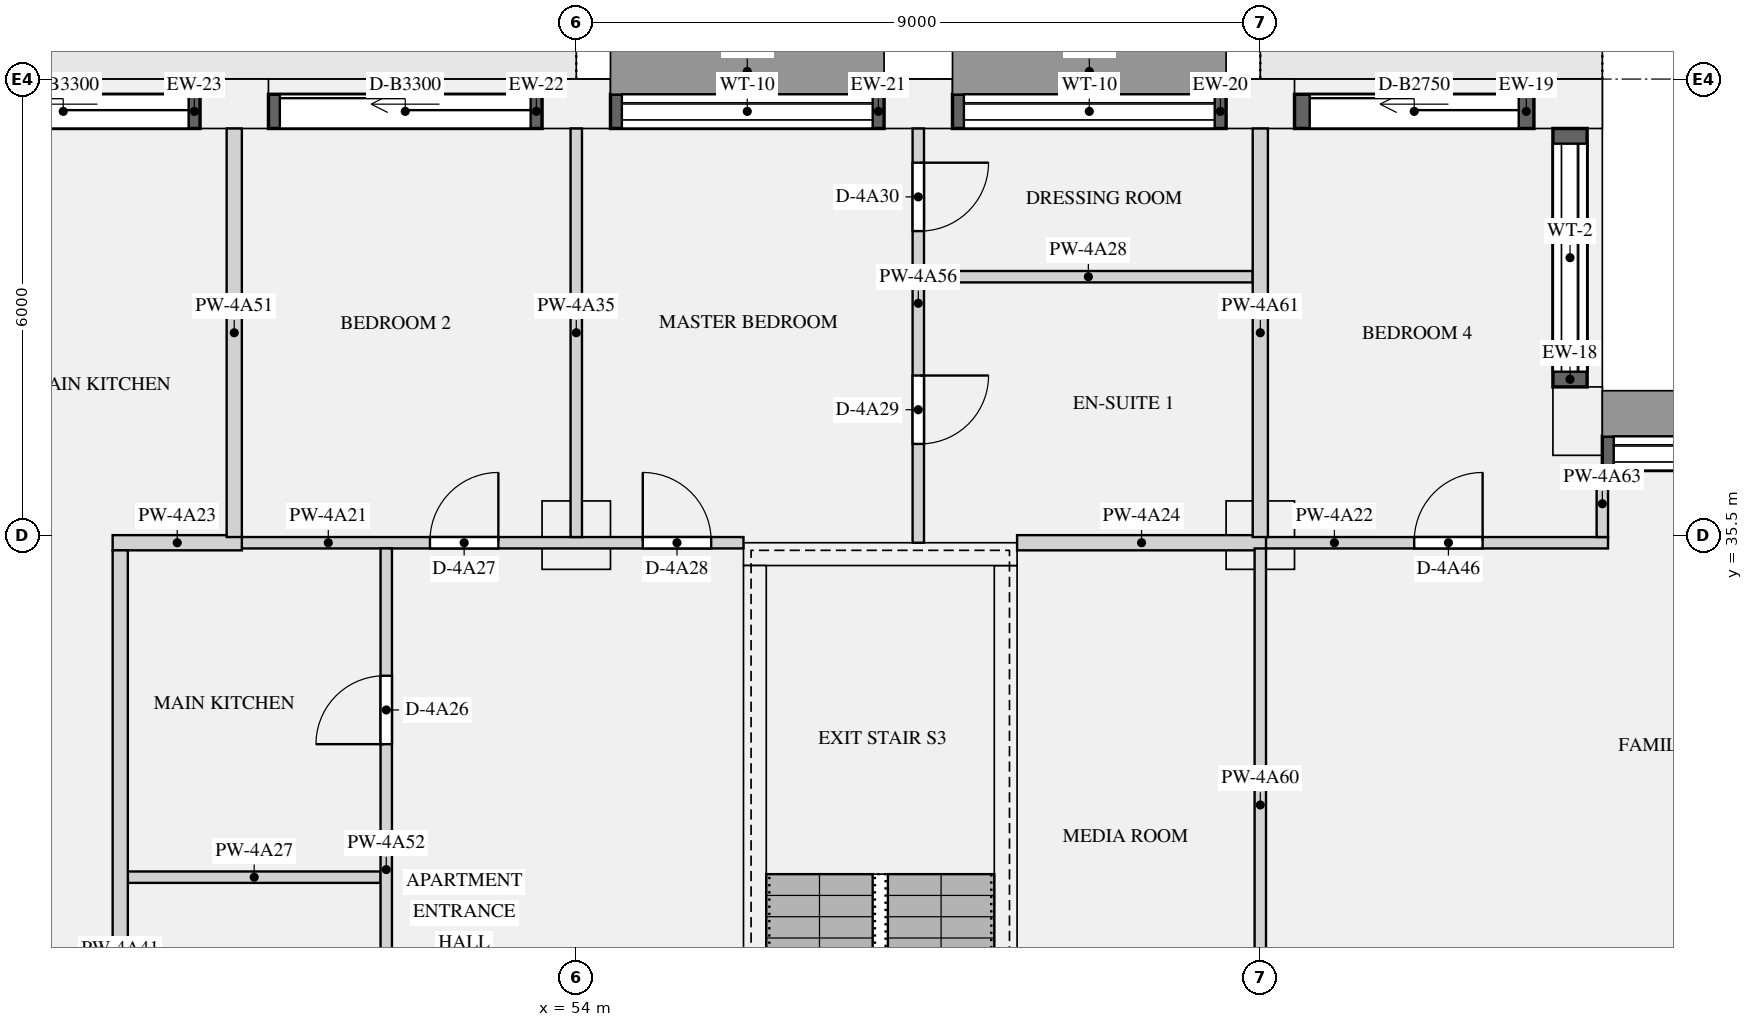
"""IFC4 building model, lengths in metres.
Left out: names, types, materials, properties, quantities, classifications, styles, units other than length and angle.
Written with IfcOpenShell. Run it as: python <this file> out.ifc"""

import sys

from ifc_helpers import new_model, si_unit, direction, frame, frame_2d, origin, origin_2d, place, context, subcontext, project, spatial, rectangle, extrude, element, fill, save


model = new_model("IFC4")
c1 = context("Model", 3, precision=1e-05, world=origin(), true_north=direction((0.0, 1.0)))
c2 = subcontext(c1, "Body", "Model", "MODEL_VIEW")
j1 = project(units=[si_unit("LENGTHUNIT", "METRE"), si_unit("PLANEANGLEUNIT", "RADIAN")], contexts=[c1])
p1 = place(None, origin())
s1 = spatial("IfcSite", under=j1, at=p1, CompositionType="ELEMENT")
p2 = place(p1, origin())
s2 = spatial("IfcBuilding", under=s1, at=p2, CompositionType="ELEMENT")
p3 = place(p2, frame((0.0, 0.0, 198.0)))
s3 = spatial("IfcBuildingStorey", under=s2, at=p3, CompositionType="ELEMENT", Elevation=198.0)
for number, where, z_axis, x_axis in (
    (1, (67.175, 37.0, 0.0), (0.0, 0.0, 1.0), (0.0, 1.0, 0.0)),
    (2, (67.05, 41.175, 0.0), (0.0, 0.0, 1.0), (-1.0, 0.0, 0.0)),
    (3, (63.0, 41.175, 0.0), (0.0, 0.0, 1.0), (-1.0, 0.0, 0.0)),
    (4, (58.5, 41.175, 0.0), (0.0, 0.0, 1.0), (-1.0, 0.0, 0.0)),
    (5, (54.0, 41.175, 0.0), (0.0, 0.0, 1.0), (-1.0, 0.0, 0.0)),
    (6, (49.5, 41.175, 0.0), (0.0, 0.0, 1.0), (-1.0, 0.0, 0.0)),
):
    element("IfcColumn", number, at=place(p3, frame(where, z_axis=z_axis, x_axis=x_axis)), inside=s3, PredefinedType="USERDEFINED", context=c2, shape_type="SweptSolid", body=[
        extrude(rectangle(XDim=0.9, YDim=0.65, at=origin_2d()), origin(), (0.0, 0.0, 1.0), 3.15),
    ])
for number, where, z_axis, x_axis in (
    (7, (54.0, 35.5, 0.0), (0.0, 0.0, 1.0), (1.0, 0.0, 0.0)),
    (8, (63.0, 35.5, 0.0), (0.0, 0.0, 1.0), (1.0, 0.0, 0.0)),
):
    element("IfcColumn", number, at=place(p3, frame(where, z_axis=z_axis, x_axis=x_axis)), inside=s3, PredefinedType="COLUMN", context=c2, shape_type="SweptSolid", body=[
        extrude(rectangle(XDim=0.9, YDim=0.9, at=origin_2d()), origin(), (0.0, 0.0, 1.0), 3.15),
    ])
p4 = place(p3, frame((56.2, 35.25, 0.0), z_axis=(0.0, 0.0, 1.0), x_axis=(1.0, 0.0, 0.0)))
e9 = element("IfcWall", 9, at=p4, inside=s3, PredefinedType="SHEAR", context=c2, shape_type="SweptSolid", body=[
    extrude(rectangle(XDim=3.6, YDim=0.3, at=frame_2d((1.8, 0.0))), origin(), (0.0, 0.0, 1.0), 3.15),
])
for number, where, z_axis, x_axis in (
    (10, (56.35, 27.3, 0.0), (0.0, 0.0, 1.0), (0.0, 1.0, 0.0)),
    (11, (59.65, 27.3, 0.0), (0.0, 0.0, 1.0), (0.0, 1.0, 0.0)),
):
    element("IfcWall", number, at=place(p3, frame(where, z_axis=z_axis, x_axis=x_axis)), inside=s3, PredefinedType="SHEAR", context=c2, shape_type="SweptSolid", body=[
        extrude(rectangle(XDim=7.8, YDim=0.3, at=frame_2d((3.9, 0.0))), origin(), (0.0, 0.0, 1.0), 3.15),
    ])
p5 = place(p3, frame((71.1, 36.575, 0.9), z_axis=(0.0, 0.0, 1.0), x_axis=(-1.0, 0.0, 0.0)))
e12 = element("IfcWall", 12, at=p5, inside=s3, PredefinedType="SOLIDWALL", context=c2, shape_type="SweptSolid", body=[
    extrude(rectangle(XDim=3.6, YDim=0.45, at=frame_2d((1.8, 0.0))), origin(), (0.0, 0.0, 1.0), 1.93),
])
p6 = place(p5, frame((0.15, 0.0, 0.15)))
e13 = element("IfcOpeningElement", 13, at=p6, cuts=e12, PredefinedType="OPENING", context=c2, shape_type="SweptSolid", body=[
    extrude(rectangle(XDim=3.3, YDim=1.5, at=frame_2d((1.65, 0.75))), frame((0.0, 0.235, 0.0), z_axis=(0.0, -1.0, 0.0), x_axis=(1.0, 0.0, 0.0)), (0.0, 0.0, 1.0), 0.47),
])
p7 = place(p3, frame((67.075, 37.45, 0.9), z_axis=(0.0, 0.0, 1.0), x_axis=(0.0, 1.0, 0.0)))
e14 = element("IfcWall", 14, at=p7, inside=s3, PredefinedType="SOLIDWALL", context=c2, shape_type="SweptSolid", body=[
    extrude(rectangle(XDim=3.4, YDim=0.45, at=frame_2d((1.7, 0.0))), origin(), (0.0, 0.0, 1.0), 1.93),
])
p8 = place(p7, frame((0.2, 0.0, 0.15)))
e15 = element("IfcOpeningElement", 15, at=p8, cuts=e14, PredefinedType="OPENING", context=c2, shape_type="SweptSolid", body=[
    extrude(rectangle(XDim=3.0, YDim=1.5, at=frame_2d((1.5, 0.75))), frame((0.0, 0.235, 0.0), z_axis=(0.0, -1.0, 0.0), x_axis=(1.0, 0.0, 0.0)), (0.0, 0.0, 1.0), 0.47),
])
p9 = place(p3, frame((66.6, 41.075, 0.0), z_axis=(0.0, 0.0, 1.0), x_axis=(-1.0, 0.0, 0.0)))
e16 = element("IfcWall", 16, at=p9, inside=s3, PredefinedType="SOLIDWALL", context=c2, shape_type="SweptSolid", body=[
    extrude(rectangle(XDim=3.15, YDim=0.45, at=frame_2d((1.575, 0.0))), origin(), (0.0, 0.0, 1.0), 2.83),
])
p10 = place(p9, frame((0.2, 0.0, 0.0)))
e17 = element("IfcOpeningElement", 17, at=p10, cuts=e16, PredefinedType="OPENING", context=c2, shape_type="SweptSolid", body=[
    extrude(rectangle(XDim=2.75, YDim=2.3, at=frame_2d((1.375, 1.15))), frame((0.0, 0.235, 0.0), z_axis=(0.0, -1.0, 0.0), x_axis=(1.0, 0.0, 0.0)), (0.0, 0.0, 1.0), 0.47),
])
p11 = place(p3, frame((62.55, 41.075, 0.9), z_axis=(0.0, 0.0, 1.0), x_axis=(-1.0, 0.0, 0.0)))
e18 = element("IfcWall", 18, at=p11, inside=s3, PredefinedType="SOLIDWALL", context=c2, shape_type="SweptSolid", body=[
    extrude(rectangle(XDim=3.6, YDim=0.45, at=frame_2d((1.8, 0.0))), origin(), (0.0, 0.0, 1.0), 1.93),
])
p12 = place(p11, frame((0.15, 0.0, 0.15)))
e19 = element("IfcOpeningElement", 19, at=p12, cuts=e18, PredefinedType="OPENING", context=c2, shape_type="SweptSolid", body=[
    extrude(rectangle(XDim=3.3, YDim=1.5, at=frame_2d((1.65, 0.75))), frame((0.0, 0.235, 0.0), z_axis=(0.0, -1.0, 0.0), x_axis=(1.0, 0.0, 0.0)), (0.0, 0.0, 1.0), 0.47),
])
p13 = place(p3, frame((58.05, 41.075, 0.9), z_axis=(0.0, 0.0, 1.0), x_axis=(-1.0, 0.0, 0.0)))
e20 = element("IfcWall", 20, at=p13, inside=s3, PredefinedType="SOLIDWALL", context=c2, shape_type="SweptSolid", body=[
    extrude(rectangle(XDim=3.6, YDim=0.45, at=frame_2d((1.8, 0.0))), origin(), (0.0, 0.0, 1.0), 1.93),
])
p14 = place(p13, frame((0.15, 0.0, 0.15)))
e21 = element("IfcOpeningElement", 21, at=p14, cuts=e20, PredefinedType="OPENING", context=c2, shape_type="SweptSolid", body=[
    extrude(rectangle(XDim=3.3, YDim=1.5, at=frame_2d((1.65, 0.75))), frame((0.0, 0.235, 0.0), z_axis=(0.0, -1.0, 0.0), x_axis=(1.0, 0.0, 0.0)), (0.0, 0.0, 1.0), 0.47),
])
p15 = place(p3, frame((53.55, 41.075, 0.0), z_axis=(0.0, 0.0, 1.0), x_axis=(-1.0, 0.0, 0.0)))
e22 = element("IfcWall", 22, at=p15, inside=s3, PredefinedType="SOLIDWALL", context=c2, shape_type="SweptSolid", body=[
    extrude(rectangle(XDim=3.6, YDim=0.45, at=frame_2d((1.8, 0.0))), origin(), (0.0, 0.0, 1.0), 2.83),
])
p16 = place(p15, frame((0.15, 0.0, 0.0)))
e23 = element("IfcOpeningElement", 23, at=p16, cuts=e22, PredefinedType="OPENING", context=c2, shape_type="SweptSolid", body=[
    extrude(rectangle(XDim=3.3, YDim=2.3, at=frame_2d((1.65, 1.15))), frame((0.0, 0.235, 0.0), z_axis=(0.0, -1.0, 0.0), x_axis=(1.0, 0.0, 0.0)), (0.0, 0.0, 1.0), 0.47),
])
p17 = place(p3, frame((49.05, 41.075, 0.0), z_axis=(0.0, 0.0, 1.0), x_axis=(-1.0, 0.0, 0.0)))
e24 = element("IfcWall", 24, at=p17, inside=s3, PredefinedType="SOLIDWALL", context=c2, shape_type="SweptSolid", body=[
    extrude(rectangle(XDim=3.6, YDim=0.45, at=frame_2d((1.8, 0.0))), origin(), (0.0, 0.0, 1.0), 2.83),
])
p18 = place(p17, frame((0.15, 0.0, 0.0)))
e25 = element("IfcOpeningElement", 25, at=p18, cuts=e24, PredefinedType="OPENING", context=c2, shape_type="SweptSolid", body=[
    extrude(rectangle(XDim=3.3, YDim=2.3, at=frame_2d((1.65, 1.15))), frame((0.0, 0.235, 0.0), z_axis=(0.0, -1.0, 0.0), x_axis=(1.0, 0.0, 0.0)), (0.0, 0.0, 1.0), 0.47),
])
p19 = place(p3, frame((49.4, 35.4, 0.0), z_axis=(0.0, 0.0, 1.0), x_axis=(1.0, 0.0, 0.0)))
e26 = element("IfcWall", 26, at=p19, inside=s3, PredefinedType="PARTITIONING", context=c2, shape_type="SweptSolid", body=[
    extrude(rectangle(XDim=6.8, YDim=0.15, at=frame_2d((3.4, 0.0))), origin(), (0.0, 0.0, 1.0), 2.83),
])
p20 = place(p19, frame((2.675, 0.0, 0.0)))
e27 = element("IfcOpeningElement", 27, at=p20, cuts=e26, PredefinedType="OPENING", context=c2, shape_type="SweptSolid", body=[
    extrude(rectangle(XDim=0.9, YDim=2.1, at=frame_2d((0.45, 1.05))), frame((0.0, 0.085, 0.0), z_axis=(0.0, -1.0, 0.0), x_axis=(1.0, 0.0, 0.0)), (0.0, 0.0, 1.0), 0.17),
])
p21 = place(p19, frame((5.475, 0.0, 0.0)))
e28 = element("IfcOpeningElement", 28, at=p21, cuts=e26, PredefinedType="OPENING", context=c2, shape_type="SweptSolid", body=[
    extrude(rectangle(XDim=0.9, YDim=2.1, at=frame_2d((0.45, 1.05))), frame((0.0, 0.085, 0.0), z_axis=(0.0, -1.0, 0.0), x_axis=(1.0, 0.0, 0.0)), (0.0, 0.0, 1.0), 0.17),
])
p22 = place(p3, frame((62.925, 35.4, 0.0), z_axis=(0.0, 0.0, 1.0), x_axis=(1.0, 0.0, 0.0)))
e29 = element("IfcWall", 29, at=p22, inside=s3, PredefinedType="PARTITIONING", context=c2, shape_type="SweptSolid", body=[
    extrude(rectangle(XDim=4.65, YDim=0.15, at=frame_2d((2.325, 0.0))), origin(), (0.0, 0.0, 1.0), 2.83),
])
p23 = place(p22, frame((2.1, 0.0, 0.0)))
e30 = element("IfcOpeningElement", 30, at=p23, cuts=e29, PredefinedType="OPENING", context=c2, shape_type="SweptSolid", body=[
    extrude(rectangle(XDim=0.9, YDim=2.1, at=frame_2d((0.45, 1.05))), frame((0.0, 0.085, 0.0), z_axis=(0.0, -1.0, 0.0), x_axis=(1.0, 0.0, 0.0)), (0.0, 0.0, 1.0), 0.17),
])
p24 = place(p3, frame((47.9, 35.4, 0.0), z_axis=(0.0, 0.0, 1.0), x_axis=(1.0, 0.0, 0.0)))
e31 = element("IfcWall", 31, at=p24, inside=s3, PredefinedType="PARTITIONING", context=c2, shape_type="SweptSolid", body=[
    extrude(rectangle(XDim=1.7, YDim=0.2, at=frame_2d((0.85, 0.0))), origin(), (0.0, 0.0, 1.0), 2.83),
])
p25 = place(p3, frame((59.8, 35.4, 0.0), z_axis=(0.0, 0.0, 1.0), x_axis=(1.0, 0.0, 0.0)))
e32 = element("IfcWall", 32, at=p25, inside=s3, PredefinedType="PARTITIONING", context=c2, shape_type="SweptSolid", body=[
    extrude(rectangle(XDim=3.275, YDim=0.2, at=frame_2d((1.637, 0.0))), origin(), (0.0, 0.0, 1.0), 2.83),
])
p26 = place(p3, frame((48.1, 31.0, 0.0), z_axis=(0.0, 0.0, 1.0), x_axis=(1.0, 0.0, 0.0)))
e33 = element("IfcWall", 33, at=p26, inside=s3, PredefinedType="PARTITIONING", context=c2, shape_type="SweptSolid", body=[
    extrude(rectangle(XDim=3.325, YDim=0.15, at=frame_2d((1.663, 0.0))), origin(), (0.0, 0.0, 1.0), 2.83),
])
p27 = place(p3, frame((58.575, 38.9, 0.0), z_axis=(0.0, 0.0, 1.0), x_axis=(1.0, 0.0, 0.0)))
e34 = element("IfcWall", 34, at=p27, inside=s3, PredefinedType="PARTITIONING", context=c2, shape_type="SweptSolid", body=[
    extrude(rectangle(XDim=4.325, YDim=0.15, at=frame_2d((2.163, 0.0))), origin(), (0.0, 0.0, 1.0), 2.83),
])
p28 = place(p3, frame((54.0, 35.475, 0.0), z_axis=(0.0, 0.0, 1.0), x_axis=(0.0, 1.0, 0.0)))
e35 = element("IfcWall", 35, at=p28, inside=s3, PredefinedType="PARTITIONING", context=c2, shape_type="SweptSolid", body=[
    extrude(rectangle(XDim=5.375, YDim=0.15, at=frame_2d((2.688, 0.0))), origin(), (0.0, 0.0, 1.0), 2.83),
])
p29 = place(p3, frame((48.0, 24.1, 0.0), z_axis=(0.0, 0.0, 1.0), x_axis=(0.0, 1.0, 0.0)))
e36 = element("IfcWall", 36, at=p29, inside=s3, PredefinedType="PARTITIONING", context=c2, shape_type="SweptSolid", body=[
    extrude(rectangle(XDim=11.2, YDim=0.2, at=frame_2d((5.6, 0.0))), origin(), (0.0, 0.0, 1.0), 2.83),
])
p30 = place(p3, frame((49.5, 35.475, 0.0), z_axis=(0.0, 0.0, 1.0), x_axis=(0.0, 1.0, 0.0)))
e37 = element("IfcWall", 37, at=p30, inside=s3, PredefinedType="PARTITIONING", context=c2, shape_type="SweptSolid", body=[
    extrude(rectangle(XDim=5.375, YDim=0.2, at=frame_2d((2.688, 0.0))), origin(), (0.0, 0.0, 1.0), 2.83),
])
p31 = place(p3, frame((51.5, 27.1, 0.0), z_axis=(0.0, 0.0, 1.0), x_axis=(0.0, 1.0, 0.0)))
e38 = element("IfcWall", 38, at=p31, inside=s3, PredefinedType="PARTITIONING", context=c2, shape_type="SweptSolid", body=[
    extrude(rectangle(XDim=8.225, YDim=0.15, at=frame_2d((4.112, 0.0))), origin(), (0.0, 0.0, 1.0), 2.83),
])
p32 = place(p31, frame((1.45, 0.0, 0.0)))
e39 = element("IfcOpeningElement", 39, at=p32, cuts=e38, PredefinedType="OPENING", context=c2, shape_type="SweptSolid", body=[
    extrude(rectangle(XDim=0.9, YDim=2.1, at=frame_2d((0.45, 1.05))), frame((0.0, 0.085, 0.0), z_axis=(0.0, -1.0, 0.0), x_axis=(1.0, 0.0, 0.0)), (0.0, 0.0, 1.0), 0.17),
])
p33 = place(p31, frame((5.65, 0.0, 0.0)))
e40 = element("IfcOpeningElement", 40, at=p33, cuts=e38, PredefinedType="OPENING", context=c2, shape_type="SweptSolid", body=[
    extrude(rectangle(XDim=0.9, YDim=2.1, at=frame_2d((0.45, 1.05))), frame((0.0, 0.085, 0.0), z_axis=(0.0, -1.0, 0.0), x_axis=(1.0, 0.0, 0.0)), (0.0, 0.0, 1.0), 0.17),
])
p34 = place(p3, frame((58.5, 35.4, 0.0), z_axis=(0.0, 0.0, 1.0), x_axis=(0.0, 1.0, 0.0)))
e41 = element("IfcWall", 41, at=p34, inside=s3, PredefinedType="PARTITIONING", context=c2, shape_type="SweptSolid", body=[
    extrude(rectangle(XDim=5.45, YDim=0.15, at=frame_2d((2.725, 0.0))), origin(), (0.0, 0.0, 1.0), 2.83),
])
p35 = place(p34, frame((1.3, 0.0, 0.0)))
e42 = element("IfcOpeningElement", 42, at=p35, cuts=e41, PredefinedType="OPENING", context=c2, shape_type="SweptSolid", body=[
    extrude(rectangle(XDim=0.9, YDim=2.1, at=frame_2d((0.45, 1.05))), frame((0.0, 0.085, 0.0), z_axis=(0.0, -1.0, 0.0), x_axis=(1.0, 0.0, 0.0)), (0.0, 0.0, 1.0), 0.17),
])
p36 = place(p34, frame((4.1, 0.0, 0.0)))
e43 = element("IfcOpeningElement", 43, at=p36, cuts=e41, PredefinedType="OPENING", context=c2, shape_type="SweptSolid", body=[
    extrude(rectangle(XDim=0.9, YDim=2.1, at=frame_2d((0.45, 1.05))), frame((0.0, 0.085, 0.0), z_axis=(0.0, -1.0, 0.0), x_axis=(1.0, 0.0, 0.0)), (0.0, 0.0, 1.0), 0.17),
])
p37 = place(p3, frame((63.0, 28.575, 0.0), z_axis=(0.0, 0.0, 1.0), x_axis=(0.0, 1.0, 0.0)))
e44 = element("IfcWall", 44, at=p37, inside=s3, PredefinedType="PARTITIONING", context=c2, shape_type="SweptSolid", body=[
    extrude(rectangle(XDim=6.75, YDim=0.15, at=frame_2d((3.375, 0.0))), origin(), (0.0, 0.0, 1.0), 2.83),
])
p38 = place(p3, frame((63.0, 35.475, 0.0), z_axis=(0.0, 0.0, 1.0), x_axis=(0.0, 1.0, 0.0)))
e45 = element("IfcWall", 45, at=p38, inside=s3, PredefinedType="PARTITIONING", context=c2, shape_type="SweptSolid", body=[
    extrude(rectangle(XDim=5.375, YDim=0.2, at=frame_2d((2.688, 0.0))), origin(), (0.0, 0.0, 1.0), 2.83),
])
p39 = place(p3, frame((67.5, 35.475, 0.0), z_axis=(0.0, 0.0, 1.0), x_axis=(0.0, 1.0, 0.0)))
e46 = element("IfcWall", 46, at=p39, inside=s3, PredefinedType="PARTITIONING", context=c2, shape_type="SweptSolid", body=[
    extrude(rectangle(XDim=0.875, YDim=0.15, at=frame_2d((0.438, 0.0))), origin(), (0.0, 0.0, 1.0), 2.83),
])
p40 = place(p6, origin())
e47 = element("IfcWindow", 47, at=p40, inside=s3, PartitioningType="SINGLE_PANEL", PredefinedType="WINDOW", context=c2, shape_type="SweptSolid", body=[
    extrude(rectangle(XDim=3.3, YDim=1.5, at=frame_2d((1.65, 0.75))), frame((0.0, -0.065, 0.0), z_axis=(0.0, -1.0, 0.0), x_axis=(1.0, 0.0, 0.0)), (0.0, 0.0, 1.0), 0.06),
])
fill(e13, e47)
p41 = place(p8, origin())
e48 = element("IfcWindow", 48, at=p41, inside=s3, PartitioningType="SINGLE_PANEL", PredefinedType="WINDOW", context=c2, shape_type="SweptSolid", body=[
    extrude(rectangle(XDim=3.0, YDim=1.5, at=frame_2d((1.5, 0.75))), frame((0.0, -0.065, 0.0), z_axis=(0.0, -1.0, 0.0), x_axis=(1.0, 0.0, 0.0)), (0.0, 0.0, 1.0), 0.06),
])
fill(e15, e48)
p42 = place(p10, origin())
e49 = element("IfcDoor", 49, at=p42, inside=s3, OperationType="SLIDING_TO_LEFT", PredefinedType="DOOR", context=c2, shape_type="SweptSolid", body=[
    extrude(rectangle(XDim=2.75, YDim=2.3, at=frame_2d((1.375, 1.15))), frame((0.0, -0.07, 0.0), z_axis=(0.0, -1.0, 0.0), x_axis=(1.0, 0.0, 0.0)), (0.0, 0.0, 1.0), 0.05),
])
fill(e17, e49)
p43 = place(p12, origin())
e50 = element("IfcWindow", 50, at=p43, inside=s3, PartitioningType="SINGLE_PANEL", PredefinedType="WINDOW", context=c2, shape_type="SweptSolid", body=[
    extrude(rectangle(XDim=3.3, YDim=1.5, at=frame_2d((1.65, 0.75))), frame((0.0, -0.065, 0.0), z_axis=(0.0, -1.0, 0.0), x_axis=(1.0, 0.0, 0.0)), (0.0, 0.0, 1.0), 0.06),
])
fill(e19, e50)
p44 = place(p14, origin())
e51 = element("IfcWindow", 51, at=p44, inside=s3, PartitioningType="SINGLE_PANEL", PredefinedType="WINDOW", context=c2, shape_type="SweptSolid", body=[
    extrude(rectangle(XDim=3.3, YDim=1.5, at=frame_2d((1.65, 0.75))), frame((0.0, -0.065, 0.0), z_axis=(0.0, -1.0, 0.0), x_axis=(1.0, 0.0, 0.0)), (0.0, 0.0, 1.0), 0.06),
])
fill(e21, e51)
p45 = place(p16, origin())
e52 = element("IfcDoor", 52, at=p45, inside=s3, OperationType="SLIDING_TO_LEFT", PredefinedType="DOOR", context=c2, shape_type="SweptSolid", body=[
    extrude(rectangle(XDim=3.3, YDim=2.3, at=frame_2d((1.65, 1.15))), frame((0.0, -0.07, 0.0), z_axis=(0.0, -1.0, 0.0), x_axis=(1.0, 0.0, 0.0)), (0.0, 0.0, 1.0), 0.05),
])
fill(e23, e52)
p46 = place(p18, origin())
e53 = element("IfcDoor", 53, at=p46, inside=s3, OperationType="SLIDING_TO_LEFT", PredefinedType="DOOR", context=c2, shape_type="SweptSolid", body=[
    extrude(rectangle(XDim=3.3, YDim=2.3, at=frame_2d((1.65, 1.15))), frame((0.0, -0.07, 0.0), z_axis=(0.0, -1.0, 0.0), x_axis=(1.0, 0.0, 0.0)), (0.0, 0.0, 1.0), 0.05),
])
fill(e25, e53)
p47 = place(p33, origin())
e54 = element("IfcDoor", 54, at=p47, inside=s3, OperationType="SINGLE_SWING_LEFT", PredefinedType="DOOR", context=c2, shape_type="SweptSolid", body=[
    extrude(rectangle(XDim=0.9, YDim=2.1, at=frame_2d((0.45, 1.05))), frame((0.0, 0.025, 0.0), z_axis=(0.0, -1.0, 0.0), x_axis=(1.0, 0.0, 0.0)), (0.0, 0.0, 1.0), 0.05),
])
fill(e40, e54)
p48 = place(p20, origin())
e55 = element("IfcDoor", 55, at=p48, inside=s3, OperationType="SINGLE_SWING_RIGHT", PredefinedType="DOOR", context=c2, shape_type="SweptSolid", body=[
    extrude(rectangle(XDim=0.9, YDim=2.1, at=frame_2d((0.45, 1.05))), frame((0.0, 0.025, 0.0), z_axis=(0.0, -1.0, 0.0), x_axis=(1.0, 0.0, 0.0)), (0.0, 0.0, 1.0), 0.05),
])
fill(e27, e55)
p49 = place(p21, origin())
e56 = element("IfcDoor", 56, at=p49, inside=s3, OperationType="SINGLE_SWING_LEFT", PredefinedType="DOOR", context=c2, shape_type="SweptSolid", body=[
    extrude(rectangle(XDim=0.9, YDim=2.1, at=frame_2d((0.45, 1.05))), frame((0.0, 0.025, 0.0), z_axis=(0.0, -1.0, 0.0), x_axis=(1.0, 0.0, 0.0)), (0.0, 0.0, 1.0), 0.05),
])
fill(e28, e56)
p50 = place(p35, frame((0.9, 0.0, 0.0), z_axis=(0.0, 0.0, 1.0), x_axis=(-1.0, 0.0, 0.0)))
e57 = element("IfcDoor", 57, at=p50, inside=s3, OperationType="SINGLE_SWING_LEFT", PredefinedType="DOOR", context=c2, shape_type="SweptSolid", body=[
    extrude(rectangle(XDim=0.9, YDim=2.1, at=frame_2d((0.45, 1.05))), frame((0.0, 0.025, 0.0), z_axis=(0.0, -1.0, 0.0), x_axis=(1.0, 0.0, 0.0)), (0.0, 0.0, 1.0), 0.05),
])
fill(e42, e57)
p51 = place(p36, frame((0.9, 0.0, 0.0), z_axis=(0.0, 0.0, 1.0), x_axis=(-1.0, 0.0, 0.0)))
e58 = element("IfcDoor", 58, at=p51, inside=s3, OperationType="SINGLE_SWING_LEFT", PredefinedType="DOOR", context=c2, shape_type="SweptSolid", body=[
    extrude(rectangle(XDim=0.9, YDim=2.1, at=frame_2d((0.45, 1.05))), frame((0.0, 0.025, 0.0), z_axis=(0.0, -1.0, 0.0), x_axis=(1.0, 0.0, 0.0)), (0.0, 0.0, 1.0), 0.05),
])
fill(e43, e58)
p52 = place(p23, origin())
e59 = element("IfcDoor", 59, at=p52, inside=s3, OperationType="SINGLE_SWING_RIGHT", PredefinedType="DOOR", context=c2, shape_type="SweptSolid", body=[
    extrude(rectangle(XDim=0.9, YDim=2.1, at=frame_2d((0.45, 1.05))), frame((0.0, 0.025, 0.0), z_axis=(0.0, -1.0, 0.0), x_axis=(1.0, 0.0, 0.0)), (0.0, 0.0, 1.0), 0.05),
])
fill(e30, e59)
save(model, sys.argv[1])
